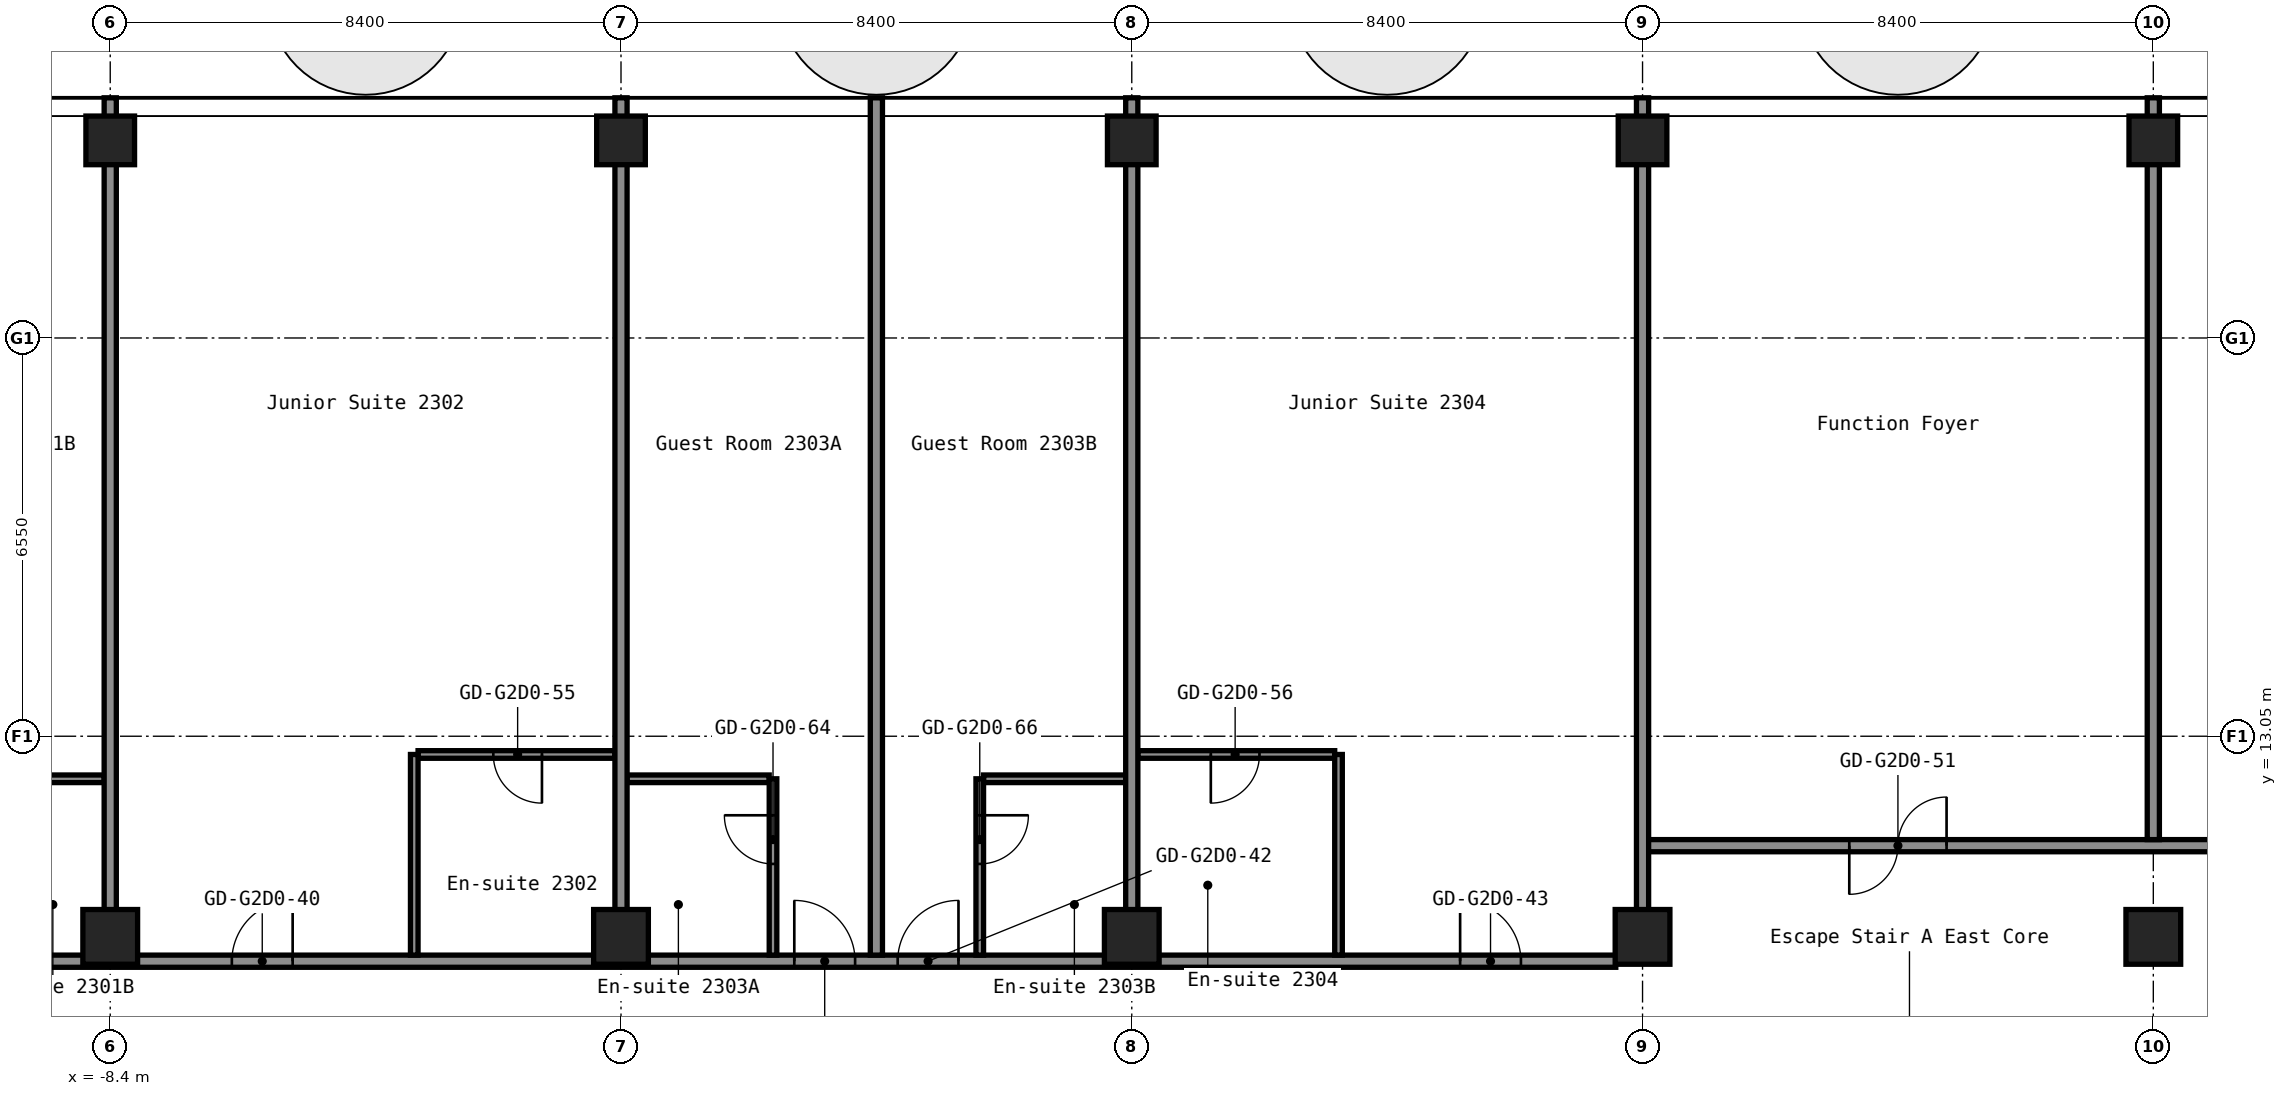
"""IFC4 building model, lengths in metres.
Left out: names, types, materials, properties, quantities, classifications, styles, units other than length and angle.
Written with IfcOpenShell. Run it as: python <this file> out.ifc"""

import sys

from ifc_helpers import new_model, si_unit, direction, frame, frame_2d, origin, origin_2d, place, context, subcontext, project, spatial, rectangle, hollow_rectangle, extrude, element, fill, save


model = new_model("IFC4")
c1 = context("Model", 3, precision=1e-05, world=origin(), true_north=direction((0.0, 1.0)))
c2 = subcontext(c1, "Body", "Model", "MODEL_VIEW")
j1 = project(units=[si_unit("LENGTHUNIT", "METRE"), si_unit("PLANEANGLEUNIT", "RADIAN")], contexts=[c1])
p1 = place(None, origin())
s1 = spatial("IfcSite", under=j1, at=p1, CompositionType="ELEMENT")
p2 = place(p1, origin())
s2 = spatial("IfcBuilding", under=s1, at=p2, CompositionType="ELEMENT")
p3 = place(p2, frame((0.0, 0.0, 85.0)))
s3 = spatial("IfcBuildingStorey", under=s2, at=p3, CompositionType="ELEMENT", Elevation=85.0)
p4 = place(p3, frame((-8.4, 9.75, 0.0), z_axis=(0.0, 0.0, 1.0), x_axis=(1.0, 0.0, 0.0)))
e1 = element("IfcColumn", 1, at=p4, inside=s3, PredefinedType="COLUMN", context=c2, shape_type="SweptSolid", body=[
    extrude(hollow_rectangle(XDim=0.9, YDim=0.9, WallThickness=0.036, at=origin_2d()), origin(), (0.0, 0.0, 1.0), 2.8),
])
p5 = place(p3, frame((-8.4, 22.85, 0.0), z_axis=(0.0, 0.0, 1.0), x_axis=(1.0, 0.0, 0.0)))
e2 = element("IfcColumn", 2, at=p5, inside=s3, PredefinedType="COLUMN", context=c2, shape_type="SweptSolid", body=[
    extrude(hollow_rectangle(XDim=0.8, YDim=0.8, WallThickness=0.032, at=origin_2d()), origin(), (0.0, 0.0, 1.0), 2.8),
])
p6 = place(p3, frame((0.0, 9.75, 0.0), z_axis=(0.0, 0.0, 1.0), x_axis=(1.0, 0.0, 0.0)))
e3 = element("IfcColumn", 3, at=p6, inside=s3, PredefinedType="COLUMN", context=c2, shape_type="SweptSolid", body=[
    extrude(hollow_rectangle(XDim=0.9, YDim=0.9, WallThickness=0.036, at=origin_2d()), origin(), (0.0, 0.0, 1.0), 2.8),
])
p7 = place(p3, frame((0.0, 22.85, 0.0), z_axis=(0.0, 0.0, 1.0), x_axis=(1.0, 0.0, 0.0)))
e4 = element("IfcColumn", 4, at=p7, inside=s3, PredefinedType="COLUMN", context=c2, shape_type="SweptSolid", body=[
    extrude(hollow_rectangle(XDim=0.8, YDim=0.8, WallThickness=0.032, at=origin_2d()), origin(), (0.0, 0.0, 1.0), 2.8),
])
p8 = place(p3, frame((8.4, 9.75, 0.0), z_axis=(0.0, 0.0, 1.0), x_axis=(1.0, 0.0, 0.0)))
e5 = element("IfcColumn", 5, at=p8, inside=s3, PredefinedType="COLUMN", context=c2, shape_type="SweptSolid", body=[
    extrude(hollow_rectangle(XDim=0.9, YDim=0.9, WallThickness=0.036, at=origin_2d()), origin(), (0.0, 0.0, 1.0), 2.8),
])
p9 = place(p3, frame((8.4, 22.85, 0.0), z_axis=(0.0, 0.0, 1.0), x_axis=(1.0, 0.0, 0.0)))
e6 = element("IfcColumn", 6, at=p9, inside=s3, PredefinedType="COLUMN", context=c2, shape_type="SweptSolid", body=[
    extrude(hollow_rectangle(XDim=0.8, YDim=0.8, WallThickness=0.032, at=origin_2d()), origin(), (0.0, 0.0, 1.0), 2.8),
])
p10 = place(p3, frame((16.8, 9.75, 0.0), z_axis=(0.0, 0.0, 1.0), x_axis=(1.0, 0.0, 0.0)))
e7 = element("IfcColumn", 7, at=p10, inside=s3, PredefinedType="COLUMN", context=c2, shape_type="SweptSolid", body=[
    extrude(hollow_rectangle(XDim=0.9, YDim=0.9, WallThickness=0.036, at=origin_2d()), origin(), (0.0, 0.0, 1.0), 2.8),
])
p11 = place(p3, frame((16.8, 22.85, 0.0), z_axis=(0.0, 0.0, 1.0), x_axis=(1.0, 0.0, 0.0)))
e8 = element("IfcColumn", 8, at=p11, inside=s3, PredefinedType="COLUMN", context=c2, shape_type="SweptSolid", body=[
    extrude(hollow_rectangle(XDim=0.8, YDim=0.8, WallThickness=0.032, at=origin_2d()), origin(), (0.0, 0.0, 1.0), 2.8),
])
p12 = place(p3, frame((25.2, 9.75, 0.0), z_axis=(0.0, 0.0, 1.0), x_axis=(1.0, 0.0, 0.0)))
e9 = element("IfcColumn", 9, at=p12, inside=s3, PredefinedType="COLUMN", context=c2, shape_type="SweptSolid", body=[
    extrude(hollow_rectangle(XDim=0.9, YDim=0.9, WallThickness=0.036, at=origin_2d()), origin(), (0.0, 0.0, 1.0), 2.8),
])
p13 = place(p3, frame((25.2, 22.85, 0.0), z_axis=(0.0, 0.0, 1.0), x_axis=(1.0, 0.0, 0.0)))
e10 = element("IfcColumn", 10, at=p13, inside=s3, PredefinedType="COLUMN", context=c2, shape_type="SweptSolid", body=[
    extrude(hollow_rectangle(XDim=0.8, YDim=0.8, WallThickness=0.032, at=origin_2d()), origin(), (0.0, 0.0, 1.0), 2.8),
])
p14 = place(p3, frame((-16.36, 9.35, 0.0), z_axis=(0.0, 0.0, 1.0), x_axis=(1.0, 0.0, 0.0)))
e11 = element("IfcWall", 11, at=p14, inside=s3, PredefinedType="PARTITIONING", context=c2, shape_type="SweptSolid", body=[
    extrude(rectangle(XDim=32.72, YDim=0.2, at=frame_2d((16.36, 0.0))), origin(), (0.0, 0.0, 1.0), 2.8),
])
p15 = place(p14, frame((2.41, 0.0, 0.0)))
e12 = element("IfcOpeningElement", 12, at=p15, cuts=e11, PredefinedType="OPENING", context=c2, shape_type="SweptSolid", body=[
    extrude(rectangle(XDim=1.0, YDim=2.1, at=frame_2d((0.5, 1.05))), frame((0.0, 0.11, 0.0), z_axis=(0.0, -1.0, 0.0), x_axis=(1.0, 0.0, 0.0)), (0.0, 0.0, 1.0), 0.22),
])
p16 = place(p14, frame((4.11, 0.0, 0.0)))
e13 = element("IfcOpeningElement", 13, at=p16, cuts=e11, PredefinedType="OPENING", context=c2, shape_type="SweptSolid", body=[
    extrude(rectangle(XDim=1.0, YDim=2.1, at=frame_2d((0.5, 1.05))), frame((0.0, 0.11, 0.0), z_axis=(0.0, -1.0, 0.0), x_axis=(1.0, 0.0, 0.0)), (0.0, 0.0, 1.0), 0.22),
])
p17 = place(p14, frame((9.96, 0.0, 0.0)))
e14 = element("IfcOpeningElement", 14, at=p17, cuts=e11, PredefinedType="OPENING", context=c2, shape_type="SweptSolid", body=[
    extrude(rectangle(XDim=1.0, YDim=2.1, at=frame_2d((0.5, 1.05))), frame((0.0, 0.11, 0.0), z_axis=(0.0, -1.0, 0.0), x_axis=(1.0, 0.0, 0.0)), (0.0, 0.0, 1.0), 0.22),
])
p18 = place(p14, frame((19.21, 0.0, 0.0)))
e15 = element("IfcOpeningElement", 15, at=p18, cuts=e11, PredefinedType="OPENING", context=c2, shape_type="SweptSolid", body=[
    extrude(rectangle(XDim=1.0, YDim=2.1, at=frame_2d((0.5, 1.05))), frame((0.0, 0.11, 0.0), z_axis=(0.0, -1.0, 0.0), x_axis=(1.0, 0.0, 0.0)), (0.0, 0.0, 1.0), 0.22),
])
p19 = place(p14, frame((20.91, 0.0, 0.0)))
e16 = element("IfcOpeningElement", 16, at=p19, cuts=e11, PredefinedType="OPENING", context=c2, shape_type="SweptSolid", body=[
    extrude(rectangle(XDim=1.0, YDim=2.1, at=frame_2d((0.5, 1.05))), frame((0.0, 0.11, 0.0), z_axis=(0.0, -1.0, 0.0), x_axis=(1.0, 0.0, 0.0)), (0.0, 0.0, 1.0), 0.22),
])
p20 = place(p14, frame((30.16, 0.0, 0.0)))
e17 = element("IfcOpeningElement", 17, at=p20, cuts=e11, PredefinedType="OPENING", context=c2, shape_type="SweptSolid", body=[
    extrude(rectangle(XDim=1.0, YDim=2.1, at=frame_2d((0.5, 1.05))), frame((0.0, 0.11, 0.0), z_axis=(0.0, -1.0, 0.0), x_axis=(1.0, 0.0, 0.0)), (0.0, 0.0, 1.0), 0.22),
])
p21 = place(p3, frame((16.8, 11.25, 0.0), z_axis=(0.0, 0.0, 1.0), x_axis=(1.0, 0.0, 0.0)))
e18 = element("IfcWall", 18, at=p21, inside=s3, PredefinedType="PARTITIONING", context=c2, shape_type="SweptSolid", body=[
    extrude(rectangle(XDim=29.7, YDim=0.2, at=frame_2d((14.85, 0.0))), origin(), (0.0, 0.0, 1.0), 2.8),
])
p22 = place(p21, frame((3.4, 0.0, 0.0)))
e19 = element("IfcOpeningElement", 19, at=p22, cuts=e18, PredefinedType="OPENING", context=c2, shape_type="SweptSolid", body=[
    extrude(rectangle(XDim=1.6, YDim=2.1, at=frame_2d((0.8, 1.05))), frame((0.0, 0.11, 0.0), z_axis=(0.0, -1.0, 0.0), x_axis=(1.0, 0.0, 0.0)), (0.0, 0.0, 1.0), 0.22),
])
p23 = place(p21, frame((11.8, 0.0, 0.0)))
e20 = element("IfcOpeningElement", 20, at=p23, cuts=e18, PredefinedType="OPENING", context=c2, shape_type="SweptSolid", body=[
    extrude(rectangle(XDim=1.6, YDim=2.1, at=frame_2d((0.8, 1.05))), frame((0.0, 0.11, 0.0), z_axis=(0.0, -1.0, 0.0), x_axis=(1.0, 0.0, 0.0)), (0.0, 0.0, 1.0), 0.22),
])
p24 = place(p21, frame((20.2, 0.0, 0.0)))
e21 = element("IfcOpeningElement", 21, at=p24, cuts=e18, PredefinedType="OPENING", context=c2, shape_type="SweptSolid", body=[
    extrude(rectangle(XDim=1.6, YDim=2.1, at=frame_2d((0.8, 1.05))), frame((0.0, 0.11, 0.0), z_axis=(0.0, -1.0, 0.0), x_axis=(1.0, 0.0, 0.0)), (0.0, 0.0, 1.0), 0.22),
])
p25 = place(p21, frame((26.85, 0.0, 0.0)))
e22 = element("IfcOpeningElement", 22, at=p25, cuts=e18, PredefinedType="OPENING", context=c2, shape_type="SweptSolid", body=[
    extrude(rectangle(XDim=0.9, YDim=2.1, at=frame_2d((0.45, 1.05))), frame((0.0, 0.11, 0.0), z_axis=(0.0, -1.0, 0.0), x_axis=(1.0, 0.0, 0.0)), (0.0, 0.0, 1.0), 0.22),
])
for number, where, z_axis, x_axis in (
    (23, (-10.837, 12.35, 0.0), (0.0, 0.0, 1.0), (1.0, 0.0, 0.0)),
    (24, (0.1, 12.35, 0.0), (0.0, 0.0, 1.0), (1.0, 0.0, 0.0)),
):
    element("IfcWall", number, at=place(p3, frame(where, z_axis=z_axis, x_axis=x_axis)), inside=s3, PredefinedType="PARTITIONING", context=c2, shape_type="SweptSolid", body=[
        extrude(rectangle(XDim=2.337, YDim=0.125, at=frame_2d((1.169, 0.0))), origin(), (0.0, 0.0, 1.0), 2.8),
    ])
p26 = place(p3, frame((5.962, 12.35, 0.0), z_axis=(0.0, 0.0, 1.0), x_axis=(1.0, 0.0, 0.0)))
e25 = element("IfcWall", 25, at=p26, inside=s3, PredefinedType="PARTITIONING", context=c2, shape_type="SweptSolid", body=[
    extrude(rectangle(XDim=2.338, YDim=0.125, at=frame_2d((1.169, 0.0))), origin(), (0.0, 0.0, 1.0), 2.8),
])
p27 = place(p3, frame((-3.337, 12.75, 0.0), z_axis=(0.0, 0.0, 1.0), x_axis=(1.0, 0.0, 0.0)))
e26 = element("IfcWall", 26, at=p27, inside=s3, PredefinedType="PARTITIONING", context=c2, shape_type="SweptSolid", body=[
    extrude(rectangle(XDim=3.237, YDim=0.125, at=frame_2d((1.619, 0.0))), origin(), (0.0, 0.0, 1.0), 2.8),
])
p28 = place(p27, frame((1.238, 0.0, 0.0)))
e27 = element("IfcOpeningElement", 27, at=p28, cuts=e26, PredefinedType="OPENING", context=c2, shape_type="SweptSolid", body=[
    extrude(rectangle(XDim=0.8, YDim=2.1, at=frame_2d((0.4, 1.05))), frame((0.0, 0.073, 0.0), z_axis=(0.0, -1.0, 0.0), x_axis=(1.0, 0.0, 0.0)), (0.0, 0.0, 1.0), 0.145),
])
p29 = place(p3, frame((8.5, 12.75, 0.0), z_axis=(0.0, 0.0, 1.0), x_axis=(1.0, 0.0, 0.0)))
e28 = element("IfcWall", 28, at=p29, inside=s3, PredefinedType="PARTITIONING", context=c2, shape_type="SweptSolid", body=[
    extrude(rectangle(XDim=3.238, YDim=0.125, at=frame_2d((1.619, 0.0))), origin(), (0.0, 0.0, 1.0), 2.8),
])
p30 = place(p29, frame((1.2, 0.0, 0.0)))
e29 = element("IfcOpeningElement", 29, at=p30, cuts=e28, PredefinedType="OPENING", context=c2, shape_type="SweptSolid", body=[
    extrude(rectangle(XDim=0.8, YDim=2.1, at=frame_2d((0.4, 1.05))), frame((0.0, 0.073, 0.0), z_axis=(0.0, -1.0, 0.0), x_axis=(1.0, 0.0, 0.0)), (0.0, 0.0, 1.0), 0.145),
])
p31 = place(p3, frame((-8.4, 10.19, 0.0), z_axis=(0.0, 0.0, 1.0), x_axis=(0.0, 1.0, 0.0)))
e30 = element("IfcWall", 30, at=p31, inside=s3, PredefinedType="PARTITIONING", context=c2, shape_type="SweptSolid", body=[
    extrude(rectangle(XDim=13.36, YDim=0.2, at=frame_2d((6.68, 0.0))), origin(), (0.0, 0.0, 1.0), 2.8),
])
p32 = place(p3, frame((-3.4, 9.45, 0.0), z_axis=(0.0, 0.0, 1.0), x_axis=(0.0, 1.0, 0.0)))
e31 = element("IfcWall", 31, at=p32, inside=s3, PredefinedType="PARTITIONING", context=c2, shape_type="SweptSolid", body=[
    extrude(rectangle(XDim=3.3, YDim=0.125, at=frame_2d((1.65, 0.0))), origin(), (0.0, 0.0, 1.0), 2.8),
])
p33 = place(p3, frame((0.0, 10.19, 0.0), z_axis=(0.0, 0.0, 1.0), x_axis=(0.0, 1.0, 0.0)))
e32 = element("IfcWall", 32, at=p33, inside=s3, PredefinedType="PARTITIONING", context=c2, shape_type="SweptSolid", body=[
    extrude(rectangle(XDim=13.36, YDim=0.2, at=frame_2d((6.68, 0.0))), origin(), (0.0, 0.0, 1.0), 2.8),
])
p34 = place(p3, frame((2.5, 9.45, 0.0), z_axis=(0.0, 0.0, 1.0), x_axis=(0.0, 1.0, 0.0)))
e33 = element("IfcWall", 33, at=p34, inside=s3, PredefinedType="PARTITIONING", context=c2, shape_type="SweptSolid", body=[
    extrude(rectangle(XDim=2.9, YDim=0.125, at=frame_2d((1.45, 0.0))), origin(), (0.0, 0.0, 1.0), 2.8),
])
p35 = place(p34, frame((1.5, 0.0, 0.0)))
e34 = element("IfcOpeningElement", 34, at=p35, cuts=e33, PredefinedType="OPENING", context=c2, shape_type="SweptSolid", body=[
    extrude(rectangle(XDim=0.8, YDim=2.1, at=frame_2d((0.4, 1.05))), frame((0.0, 0.073, 0.0), z_axis=(0.0, -1.0, 0.0), x_axis=(1.0, 0.0, 0.0)), (0.0, 0.0, 1.0), 0.145),
])
p36 = place(p3, frame((4.2, 9.45, 0.0), z_axis=(0.0, 0.0, 1.0), x_axis=(0.0, 1.0, 0.0)))
e35 = element("IfcWall", 35, at=p36, inside=s3, PredefinedType="PARTITIONING", context=c2, shape_type="SweptSolid", body=[
    extrude(rectangle(XDim=14.1, YDim=0.2, at=frame_2d((7.05, 0.0))), origin(), (0.0, 0.0, 1.0), 2.8),
])
p37 = place(p3, frame((5.9, 9.45, 0.0), z_axis=(0.0, 0.0, 1.0), x_axis=(0.0, 1.0, 0.0)))
e36 = element("IfcWall", 36, at=p37, inside=s3, PredefinedType="PARTITIONING", context=c2, shape_type="SweptSolid", body=[
    extrude(rectangle(XDim=2.9, YDim=0.125, at=frame_2d((1.45, 0.0))), origin(), (0.0, 0.0, 1.0), 2.8),
])
p38 = place(p37, frame((1.5, 0.0, 0.0)))
e37 = element("IfcOpeningElement", 37, at=p38, cuts=e36, PredefinedType="OPENING", context=c2, shape_type="SweptSolid", body=[
    extrude(rectangle(XDim=0.8, YDim=2.1, at=frame_2d((0.4, 1.05))), frame((0.0, 0.073, 0.0), z_axis=(0.0, -1.0, 0.0), x_axis=(1.0, 0.0, 0.0)), (0.0, 0.0, 1.0), 0.145),
])
p39 = place(p3, frame((8.4, 10.19, 0.0), z_axis=(0.0, 0.0, 1.0), x_axis=(0.0, 1.0, 0.0)))
e38 = element("IfcWall", 38, at=p39, inside=s3, PredefinedType="PARTITIONING", context=c2, shape_type="SweptSolid", body=[
    extrude(rectangle(XDim=13.36, YDim=0.2, at=frame_2d((6.68, 0.0))), origin(), (0.0, 0.0, 1.0), 2.8),
])
p40 = place(p3, frame((11.8, 9.45, 0.0), z_axis=(0.0, 0.0, 1.0), x_axis=(0.0, 1.0, 0.0)))
e39 = element("IfcWall", 39, at=p40, inside=s3, PredefinedType="PARTITIONING", context=c2, shape_type="SweptSolid", body=[
    extrude(rectangle(XDim=3.3, YDim=0.125, at=frame_2d((1.65, 0.0))), origin(), (0.0, 0.0, 1.0), 2.8),
])
p41 = place(p3, frame((16.8, 10.19, 0.0), z_axis=(0.0, 0.0, 1.0), x_axis=(0.0, 1.0, 0.0)))
e40 = element("IfcWall", 40, at=p41, inside=s3, PredefinedType="PARTITIONING", context=c2, shape_type="SweptSolid", body=[
    extrude(rectangle(XDim=13.36, YDim=0.2, at=frame_2d((6.68, 0.0))), origin(), (0.0, 0.0, 1.0), 2.8),
])
p42 = place(p3, frame((25.2, 11.35, 0.0), z_axis=(0.0, 0.0, 1.0), x_axis=(0.0, 1.0, 0.0)))
e41 = element("IfcWall", 41, at=p42, inside=s3, PredefinedType="PARTITIONING", context=c2, shape_type="SweptSolid", body=[
    extrude(rectangle(XDim=12.2, YDim=0.2, at=frame_2d((6.1, 0.0))), origin(), (0.0, 0.0, 1.0), 2.8),
])
p43 = place(p17, origin())
e42 = element("IfcDoor", 42, at=p43, inside=s3, OperationType="SINGLE_SWING_LEFT", PredefinedType="DOOR", context=c2, shape_type="SweptSolid", body=[
    extrude(rectangle(XDim=1.0, YDim=2.1, at=frame_2d((0.5, 1.05))), frame((0.0, 0.025, 0.0), z_axis=(0.0, -1.0, 0.0), x_axis=(1.0, 0.0, 0.0)), (0.0, 0.0, 1.0), 0.05),
])
fill(e14, e42)
p44 = place(p18, origin())
e43 = element("IfcDoor", 43, at=p44, inside=s3, OperationType="SINGLE_SWING_RIGHT", PredefinedType="DOOR", context=c2, shape_type="SweptSolid", body=[
    extrude(rectangle(XDim=1.0, YDim=2.1, at=frame_2d((0.5, 1.05))), frame((0.0, 0.025, 0.0), z_axis=(0.0, -1.0, 0.0), x_axis=(1.0, 0.0, 0.0)), (0.0, 0.0, 1.0), 0.05),
])
fill(e15, e43)
p45 = place(p19, origin())
e44 = element("IfcDoor", 44, at=p45, inside=s3, OperationType="SINGLE_SWING_LEFT", PredefinedType="DOOR", context=c2, shape_type="SweptSolid", body=[
    extrude(rectangle(XDim=1.0, YDim=2.1, at=frame_2d((0.5, 1.05))), frame((0.0, 0.025, 0.0), z_axis=(0.0, -1.0, 0.0), x_axis=(1.0, 0.0, 0.0)), (0.0, 0.0, 1.0), 0.05),
])
fill(e16, e44)
p46 = place(p20, origin())
e45 = element("IfcDoor", 45, at=p46, inside=s3, OperationType="SINGLE_SWING_RIGHT", PredefinedType="DOOR", context=c2, shape_type="SweptSolid", body=[
    extrude(rectangle(XDim=1.0, YDim=2.1, at=frame_2d((0.5, 1.05))), frame((0.0, 0.025, 0.0), z_axis=(0.0, -1.0, 0.0), x_axis=(1.0, 0.0, 0.0)), (0.0, 0.0, 1.0), 0.05),
])
fill(e17, e45)
p47 = place(p22, origin())
e46 = element("IfcDoor", 46, at=p47, inside=s3, OperationType="DOUBLE_DOOR_SINGLE_SWING", PredefinedType="DOOR", context=c2, shape_type="SweptSolid", body=[
    extrude(rectangle(XDim=1.6, YDim=2.1, at=frame_2d((0.8, 1.05))), frame((0.0, 0.025, 0.0), z_axis=(0.0, -1.0, 0.0), x_axis=(1.0, 0.0, 0.0)), (0.0, 0.0, 1.0), 0.05),
])
fill(e19, e46)
p48 = place(p28, origin())
e47 = element("IfcDoor", 47, at=p48, inside=s3, OperationType="SINGLE_SWING_RIGHT", PredefinedType="DOOR", context=c2, shape_type="SweptSolid", body=[
    extrude(rectangle(XDim=0.8, YDim=2.1, at=frame_2d((0.4, 1.05))), frame((0.0, 0.025, 0.0), z_axis=(0.0, -1.0, 0.0), x_axis=(1.0, 0.0, 0.0)), (0.0, 0.0, 1.0), 0.05),
])
fill(e27, e47)
p49 = place(p30, origin())
e48 = element("IfcDoor", 48, at=p49, inside=s3, OperationType="SINGLE_SWING_LEFT", PredefinedType="DOOR", context=c2, shape_type="SweptSolid", body=[
    extrude(rectangle(XDim=0.8, YDim=2.1, at=frame_2d((0.4, 1.05))), frame((0.0, 0.025, 0.0), z_axis=(0.0, -1.0, 0.0), x_axis=(1.0, 0.0, 0.0)), (0.0, 0.0, 1.0), 0.05),
])
fill(e29, e48)
p50 = place(p35, origin())
e49 = element("IfcDoor", 49, at=p50, inside=s3, OperationType="SINGLE_SWING_LEFT", PredefinedType="DOOR", context=c2, shape_type="SweptSolid", body=[
    extrude(rectangle(XDim=0.8, YDim=2.1, at=frame_2d((0.4, 1.05))), frame((0.0, 0.025, 0.0), z_axis=(0.0, -1.0, 0.0), x_axis=(1.0, 0.0, 0.0)), (0.0, 0.0, 1.0), 0.05),
])
fill(e34, e49)
p51 = place(p38, origin())
e50 = element("IfcDoor", 50, at=p51, inside=s3, OperationType="SINGLE_SWING_RIGHT", PredefinedType="DOOR", context=c2, shape_type="SweptSolid", body=[
    extrude(rectangle(XDim=0.8, YDim=2.1, at=frame_2d((0.4, 1.05))), frame((0.0, 0.025, 0.0), z_axis=(0.0, -1.0, 0.0), x_axis=(1.0, 0.0, 0.0)), (0.0, 0.0, 1.0), 0.05),
])
fill(e37, e50)
save(model, sys.argv[1])
